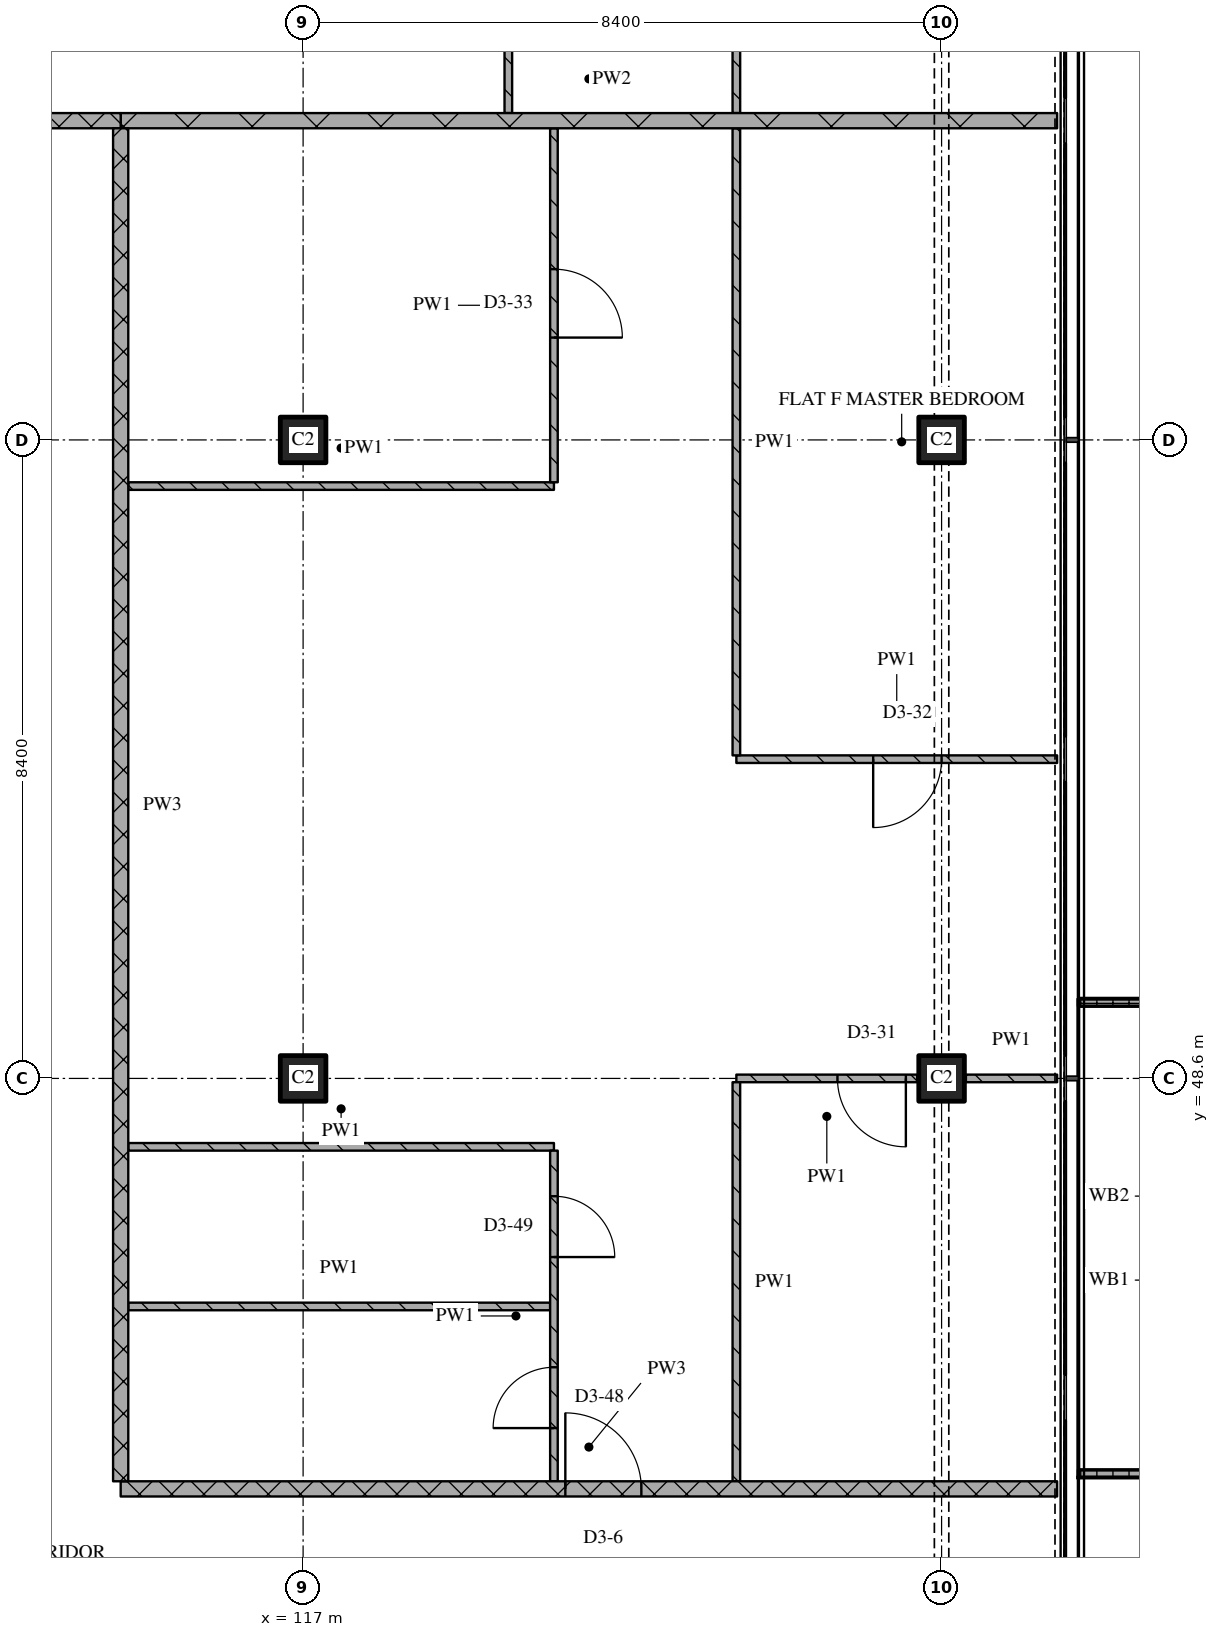
"""IFC4 building model, lengths in metres.
Left out: names, types, materials, properties, quantities, classifications, styles, units other than length and angle.
Written with IfcOpenShell. Run it as: python <this file> out.ifc"""

import sys

from ifc_helpers import new_model, si_unit, direction, frame, frame_2d, origin, origin_2d, place, context, subcontext, project, spatial, polyline, rectangle, outline, extrude, element, fill, save


model = new_model("IFC4")
c1 = context("Model", 3, precision=1e-05, world=origin(), true_north=direction((0.0, 1.0)))
c2 = subcontext(c1, "Body", "Model", "MODEL_VIEW")
j1 = project(units=[si_unit("LENGTHUNIT", "METRE"), si_unit("PLANEANGLEUNIT", "RADIAN")], contexts=[c1])
p1 = place(None, origin())
s1 = spatial("IfcSite", under=j1, at=p1, CompositionType="ELEMENT")
p2 = place(p1, origin())
s2 = spatial("IfcBuilding", under=s1, at=p2, CompositionType="ELEMENT")
p3 = place(p2, frame((0.0, 0.0, 234.3)))
s3 = spatial("IfcBuildingStorey", under=s2, at=p3, CompositionType="ELEMENT", Elevation=234.3)
for number, where, z_axis, x_axis in (
    (1, (117.0, 48.6, 0.0), (0.0, 0.0, 1.0), (1.0, 0.0, 0.0)),
    (2, (117.0, 57.0, 0.0), (0.0, 0.0, 1.0), (1.0, 0.0, 0.0)),
    (3, (125.4, 48.6, 0.0), (0.0, 0.0, 1.0), (1.0, 0.0, 0.0)),
    (4, (125.4, 57.0, 0.0), (0.0, 0.0, 1.0), (1.0, 0.0, 0.0)),
):
    element("IfcColumn", number, at=place(p3, frame(where, z_axis=z_axis, x_axis=x_axis)), inside=s3, PredefinedType="COLUMN", context=c2, shape_type="SweptSolid", body=[
        extrude(rectangle(XDim=0.6, YDim=0.6, at=origin_2d()), origin(), (0.0, 0.0, 1.0), 3.6),
    ])
p4 = place(p3, origin())
e5 = element("IfcWall", 5, at=p4, inside=s3, PredefinedType="SOLIDWALL", context=c2, shape_type="SweptSolid", body=[
    extrude(outline(polyline([(127.2, 43.35), (127.2, 43.45), (128.967, 43.45), (128.967, 49.55), (127.2, 49.55), (127.2, 49.65), (129.067, 49.65), (129.067, 43.35), (127.2, 43.35)])), origin(), (0.0, 0.0, 1.0), 1.0),
])
p5 = place(p3, frame((114.6, 43.2, 0.0), z_axis=(0.0, 0.0, 1.0), x_axis=(1.0, 0.0, 0.0)))
e6 = element("IfcWall", 6, at=p5, inside=s3, PredefinedType="PARTITIONING", context=c2, shape_type="SweptSolid", body=[
    extrude(rectangle(XDim=12.32, YDim=0.2, at=frame_2d((6.16, 0.0))), origin(), (0.0, 0.0, 1.0), 3.32),
])
p6 = place(p5, frame((5.85, 0.0, 0.0)))
e7 = element("IfcOpeningElement", 7, at=p6, cuts=e6, PredefinedType="OPENING", context=c2, shape_type="SweptSolid", body=[
    extrude(rectangle(XDim=1.0, YDim=2.1, at=frame_2d((0.5, 1.05))), frame((0.0, 0.11, 0.0), z_axis=(0.0, -1.0, 0.0), x_axis=(1.0, 0.0, 0.0)), (0.0, 0.0, 1.0), 0.22),
])
p7 = place(p3, frame((114.7, 45.6, 0.0), z_axis=(0.0, 0.0, 1.0), x_axis=(1.0, 0.0, 0.0)))
e8 = element("IfcWall", 8, at=p7, inside=s3, PredefinedType="PARTITIONING", context=c2, shape_type="SweptSolid", body=[
    extrude(rectangle(XDim=5.55, YDim=0.1, at=frame_2d((2.775, 0.0))), origin(), (0.0, 0.0, 1.0), 3.32),
])
p8 = place(p3, frame((114.7, 47.7, 0.0), z_axis=(0.0, 0.0, 1.0), x_axis=(1.0, 0.0, 0.0)))
e9 = element("IfcWall", 9, at=p8, inside=s3, PredefinedType="PARTITIONING", context=c2, shape_type="SweptSolid", body=[
    extrude(rectangle(XDim=5.6, YDim=0.1, at=frame_2d((2.8, 0.0))), origin(), (0.0, 0.0, 1.0), 3.32),
])
p9 = place(p3, frame((125.08, 48.6, 0.0), z_axis=(0.0, 0.0, 1.0), x_axis=(-1.0, 0.0, 0.0)))
e10 = element("IfcWall", 10, at=p9, inside=s3, PredefinedType="PARTITIONING", context=c2, shape_type="SweptSolid", body=[
    extrude(rectangle(XDim=2.38, YDim=0.1, at=frame_2d((1.19, 0.0))), origin(), (0.0, 0.0, 1.0), 3.32),
])
p10 = place(p9, frame((0.15, 0.0, 0.0)))
e11 = element("IfcOpeningElement", 11, at=p10, cuts=e10, PredefinedType="OPENING", context=c2, shape_type="SweptSolid", body=[
    extrude(rectangle(XDim=0.9, YDim=2.1, at=frame_2d((0.45, 1.05))), frame((0.0, 0.06, 0.0), z_axis=(0.0, -1.0, 0.0), x_axis=(1.0, 0.0, 0.0)), (0.0, 0.0, 1.0), 0.12),
])
p11 = place(p3, frame((125.72, 48.6, 0.0), z_axis=(0.0, 0.0, 1.0), x_axis=(1.0, 0.0, 0.0)))
e12 = element("IfcWall", 12, at=p11, inside=s3, PredefinedType="PARTITIONING", context=c2, shape_type="SweptSolid", body=[
    extrude(rectangle(XDim=1.2, YDim=0.1, at=frame_2d((0.6, 0.0))), origin(), (0.0, 0.0, 1.0), 3.32),
])
p12 = place(p3, frame((122.7, 52.8, 0.0), z_axis=(0.0, 0.0, 1.0), x_axis=(1.0, 0.0, 0.0)))
e13 = element("IfcWall", 13, at=p12, inside=s3, PredefinedType="PARTITIONING", context=c2, shape_type="SweptSolid", body=[
    extrude(rectangle(XDim=4.22, YDim=0.1, at=frame_2d((2.11, 0.0))), origin(), (0.0, 0.0, 1.0), 3.32),
])
p13 = place(p12, frame((1.8, 0.0, 0.0)))
e14 = element("IfcOpeningElement", 14, at=p13, cuts=e13, PredefinedType="OPENING", context=c2, shape_type="SweptSolid", body=[
    extrude(rectangle(XDim=0.9, YDim=2.1, at=frame_2d((0.45, 1.05))), frame((0.0, 0.06, 0.0), z_axis=(0.0, -1.0, 0.0), x_axis=(1.0, 0.0, 0.0)), (0.0, 0.0, 1.0), 0.12),
])
p14 = place(p3, frame((114.7, 56.393, 0.0), z_axis=(0.0, 0.0, 1.0), x_axis=(1.0, 0.0, 0.0)))
e15 = element("IfcWall", 15, at=p14, inside=s3, PredefinedType="PARTITIONING", context=c2, shape_type="SweptSolid", body=[
    extrude(rectangle(XDim=5.6, YDim=0.1, at=frame_2d((2.8, 0.0))), origin(), (0.0, 0.0, 1.0), 3.32),
])
p15 = place(p3, frame((111.0, 61.2, 0.0), z_axis=(0.0, 0.0, 1.0), x_axis=(1.0, 0.0, 0.0)))
e16 = element("IfcWall", 16, at=p15, inside=s3, PredefinedType="PARTITIONING", context=c2, shape_type="SweptSolid", body=[
    extrude(rectangle(XDim=3.6, YDim=0.2, at=frame_2d((1.8, 0.0))), origin(), (0.0, 0.0, 1.0), 3.32),
])
p16 = place(p3, frame((114.6, 61.2, 0.0), z_axis=(0.0, 0.0, 1.0), x_axis=(1.0, 0.0, 0.0)))
e17 = element("IfcWall", 17, at=p16, inside=s3, PredefinedType="PARTITIONING", context=c2, shape_type="SweptSolid", body=[
    extrude(rectangle(XDim=12.32, YDim=0.2, at=frame_2d((6.16, 0.0))), origin(), (0.0, 0.0, 1.0), 3.32),
])
p17 = place(p3, frame((114.6, 61.1, 0.0), z_axis=(0.0, 0.0, 1.0), x_axis=(0.0, -1.0, 0.0)))
e18 = element("IfcWall", 18, at=p17, inside=s3, PredefinedType="PARTITIONING", context=c2, shape_type="SweptSolid", body=[
    extrude(rectangle(XDim=17.8, YDim=0.2, at=frame_2d((8.9, 0.0))), origin(), (0.0, 0.0, 1.0), 3.32),
])
p18 = place(p3, frame((119.7, 61.3, 0.0), z_axis=(0.0, 0.0, 1.0), x_axis=(0.0, 1.0, 0.0)))
e19 = element("IfcWall", 19, at=p18, inside=s3, PredefinedType="PARTITIONING", context=c2, shape_type="SweptSolid", body=[
    extrude(rectangle(XDim=5.55, YDim=0.1, at=frame_2d((2.775, 0.0))), origin(), (0.0, 0.0, 1.0), 3.32),
])
p19 = place(p18, frame((1.023, 0.0, 0.0)))
e20 = element("IfcOpeningElement", 20, at=p19, cuts=e19, PredefinedType="OPENING", context=c2, shape_type="SweptSolid", body=[
    extrude(rectangle(XDim=0.8, YDim=2.1, at=frame_2d((0.4, 1.05))), frame((0.0, 0.06, 0.0), z_axis=(0.0, -1.0, 0.0), x_axis=(1.0, 0.0, 0.0)), (0.0, 0.0, 1.0), 0.12),
])
p20 = place(p3, frame((120.3, 43.3, 0.0), z_axis=(0.0, 0.0, 1.0), x_axis=(0.0, 1.0, 0.0)))
e21 = element("IfcWall", 21, at=p20, inside=s3, PredefinedType="PARTITIONING", context=c2, shape_type="SweptSolid", body=[
    extrude(rectangle(XDim=4.35, YDim=0.1, at=frame_2d((2.175, 0.0))), origin(), (0.0, 0.0, 1.0), 3.32),
])
p21 = place(p20, frame((0.7, 0.0, 0.0)))
e22 = element("IfcOpeningElement", 22, at=p21, cuts=e21, PredefinedType="OPENING", context=c2, shape_type="SweptSolid", body=[
    extrude(rectangle(XDim=0.8, YDim=2.1, at=frame_2d((0.4, 1.05))), frame((0.0, 0.06, 0.0), z_axis=(0.0, -1.0, 0.0), x_axis=(1.0, 0.0, 0.0)), (0.0, 0.0, 1.0), 0.12),
])
p22 = place(p20, frame((2.95, 0.0, 0.0)))
e23 = element("IfcOpeningElement", 23, at=p22, cuts=e21, PredefinedType="OPENING", context=c2, shape_type="SweptSolid", body=[
    extrude(rectangle(XDim=0.8, YDim=2.1, at=frame_2d((0.4, 1.05))), frame((0.0, 0.06, 0.0), z_axis=(0.0, -1.0, 0.0), x_axis=(1.0, 0.0, 0.0)), (0.0, 0.0, 1.0), 0.12),
])
p23 = place(p3, frame((120.3, 56.443, 0.0), z_axis=(0.0, 0.0, 1.0), x_axis=(0.0, 1.0, 0.0)))
e24 = element("IfcWall", 24, at=p23, inside=s3, PredefinedType="PARTITIONING", context=c2, shape_type="SweptSolid", body=[
    extrude(rectangle(XDim=4.657, YDim=0.1, at=frame_2d((2.329, 0.0))), origin(), (0.0, 0.0, 1.0), 3.32),
])
p24 = place(p23, frame((1.904, 0.0, 0.0)))
e25 = element("IfcOpeningElement", 25, at=p24, cuts=e24, PredefinedType="OPENING", context=c2, shape_type="SweptSolid", body=[
    extrude(rectangle(XDim=0.9, YDim=2.1, at=frame_2d((0.45, 1.05))), frame((0.0, 0.06, 0.0), z_axis=(0.0, -1.0, 0.0), x_axis=(1.0, 0.0, 0.0)), (0.0, 0.0, 1.0), 0.12),
])
p25 = place(p3, frame((122.7, 48.55, 0.0), z_axis=(0.0, 0.0, 1.0), x_axis=(0.0, -1.0, 0.0)))
e26 = element("IfcWall", 26, at=p25, inside=s3, PredefinedType="PARTITIONING", context=c2, shape_type="SweptSolid", body=[
    extrude(rectangle(XDim=5.25, YDim=0.1, at=frame_2d((2.625, 0.0))), origin(), (0.0, 0.0, 1.0), 3.32),
])
p26 = place(p3, frame((122.7, 61.1, 0.0), z_axis=(0.0, 0.0, 1.0), x_axis=(0.0, -1.0, 0.0)))
e27 = element("IfcWall", 27, at=p26, inside=s3, PredefinedType="PARTITIONING", context=c2, shape_type="SweptSolid", body=[
    extrude(rectangle(XDim=8.25, YDim=0.1, at=frame_2d((4.125, 0.0))), origin(), (0.0, 0.0, 1.0), 3.32),
])
p27 = place(p3, frame((122.7, 65.35, 0.0), z_axis=(0.0, 0.0, 1.0), x_axis=(0.0, -1.0, 0.0)))
e28 = element("IfcWall", 28, at=p27, inside=s3, PredefinedType="PARTITIONING", context=c2, shape_type="SweptSolid", body=[
    extrude(rectangle(XDim=4.05, YDim=0.1, at=frame_2d((2.025, 0.0))), origin(), (0.0, 0.0, 1.0), 3.32),
])
p28 = place(p6, origin())
e29 = element("IfcDoor", 29, at=p28, inside=s3, OperationType="SINGLE_SWING_LEFT", PredefinedType="DOOR", context=c2, shape_type="SweptSolid", body=[
    extrude(rectangle(XDim=1.0, YDim=2.1, at=frame_2d((0.5, 1.05))), frame((0.0, 0.025, 0.0), z_axis=(0.0, -1.0, 0.0), x_axis=(1.0, 0.0, 0.0)), (0.0, 0.0, 1.0), 0.05),
])
fill(e7, e29)
p29 = place(p10, origin())
e30 = element("IfcDoor", 30, at=p29, inside=s3, OperationType="SINGLE_SWING_LEFT", PredefinedType="DOOR", context=c2, shape_type="SweptSolid", body=[
    extrude(rectangle(XDim=0.9, YDim=2.1, at=frame_2d((0.45, 1.05))), frame((0.0, 0.025, 0.0), z_axis=(0.0, -1.0, 0.0), x_axis=(1.0, 0.0, 0.0)), (0.0, 0.0, 1.0), 0.05),
])
fill(e11, e30)
p30 = place(p13, origin())
e31 = element("IfcDoor", 31, at=p30, inside=s3, OperationType="SINGLE_SWING_RIGHT", PredefinedType="DOOR", context=c2, shape_type="SweptSolid", body=[
    extrude(rectangle(XDim=0.9, YDim=2.1, at=frame_2d((0.45, 1.05))), frame((0.0, 0.025, 0.0), z_axis=(0.0, -1.0, 0.0), x_axis=(1.0, 0.0, 0.0)), (0.0, 0.0, 1.0), 0.05),
])
fill(e14, e31)
p31 = place(p21, origin())
e32 = element("IfcDoor", 32, at=p31, inside=s3, OperationType="SINGLE_SWING_LEFT", PredefinedType="DOOR", context=c2, shape_type="SweptSolid", body=[
    extrude(rectangle(XDim=0.8, YDim=2.1, at=frame_2d((0.4, 1.05))), frame((0.0, 0.025, 0.0), z_axis=(0.0, -1.0, 0.0), x_axis=(1.0, 0.0, 0.0)), (0.0, 0.0, 1.0), 0.05),
])
fill(e22, e32)
p32 = place(p22, origin())
e33 = element("IfcDoor", 33, at=p32, inside=s3, OperationType="SINGLE_SWING_RIGHT", PredefinedType="DOOR", context=c2, shape_type="SweptSolid", body=[
    extrude(rectangle(XDim=0.8, YDim=2.1, at=frame_2d((0.4, 1.05))), frame((0.0, 0.025, 0.0), z_axis=(0.0, -1.0, 0.0), x_axis=(1.0, 0.0, 0.0)), (0.0, 0.0, 1.0), 0.05),
])
fill(e23, e33)
p33 = place(p24, origin())
e34 = element("IfcDoor", 34, at=p33, inside=s3, OperationType="SINGLE_SWING_RIGHT", PredefinedType="DOOR", context=c2, shape_type="SweptSolid", body=[
    extrude(rectangle(XDim=0.9, YDim=2.1, at=frame_2d((0.45, 1.05))), frame((0.0, 0.025, 0.0), z_axis=(0.0, -1.0, 0.0), x_axis=(1.0, 0.0, 0.0)), (0.0, 0.0, 1.0), 0.05),
])
fill(e25, e34)
save(model, sys.argv[1])
